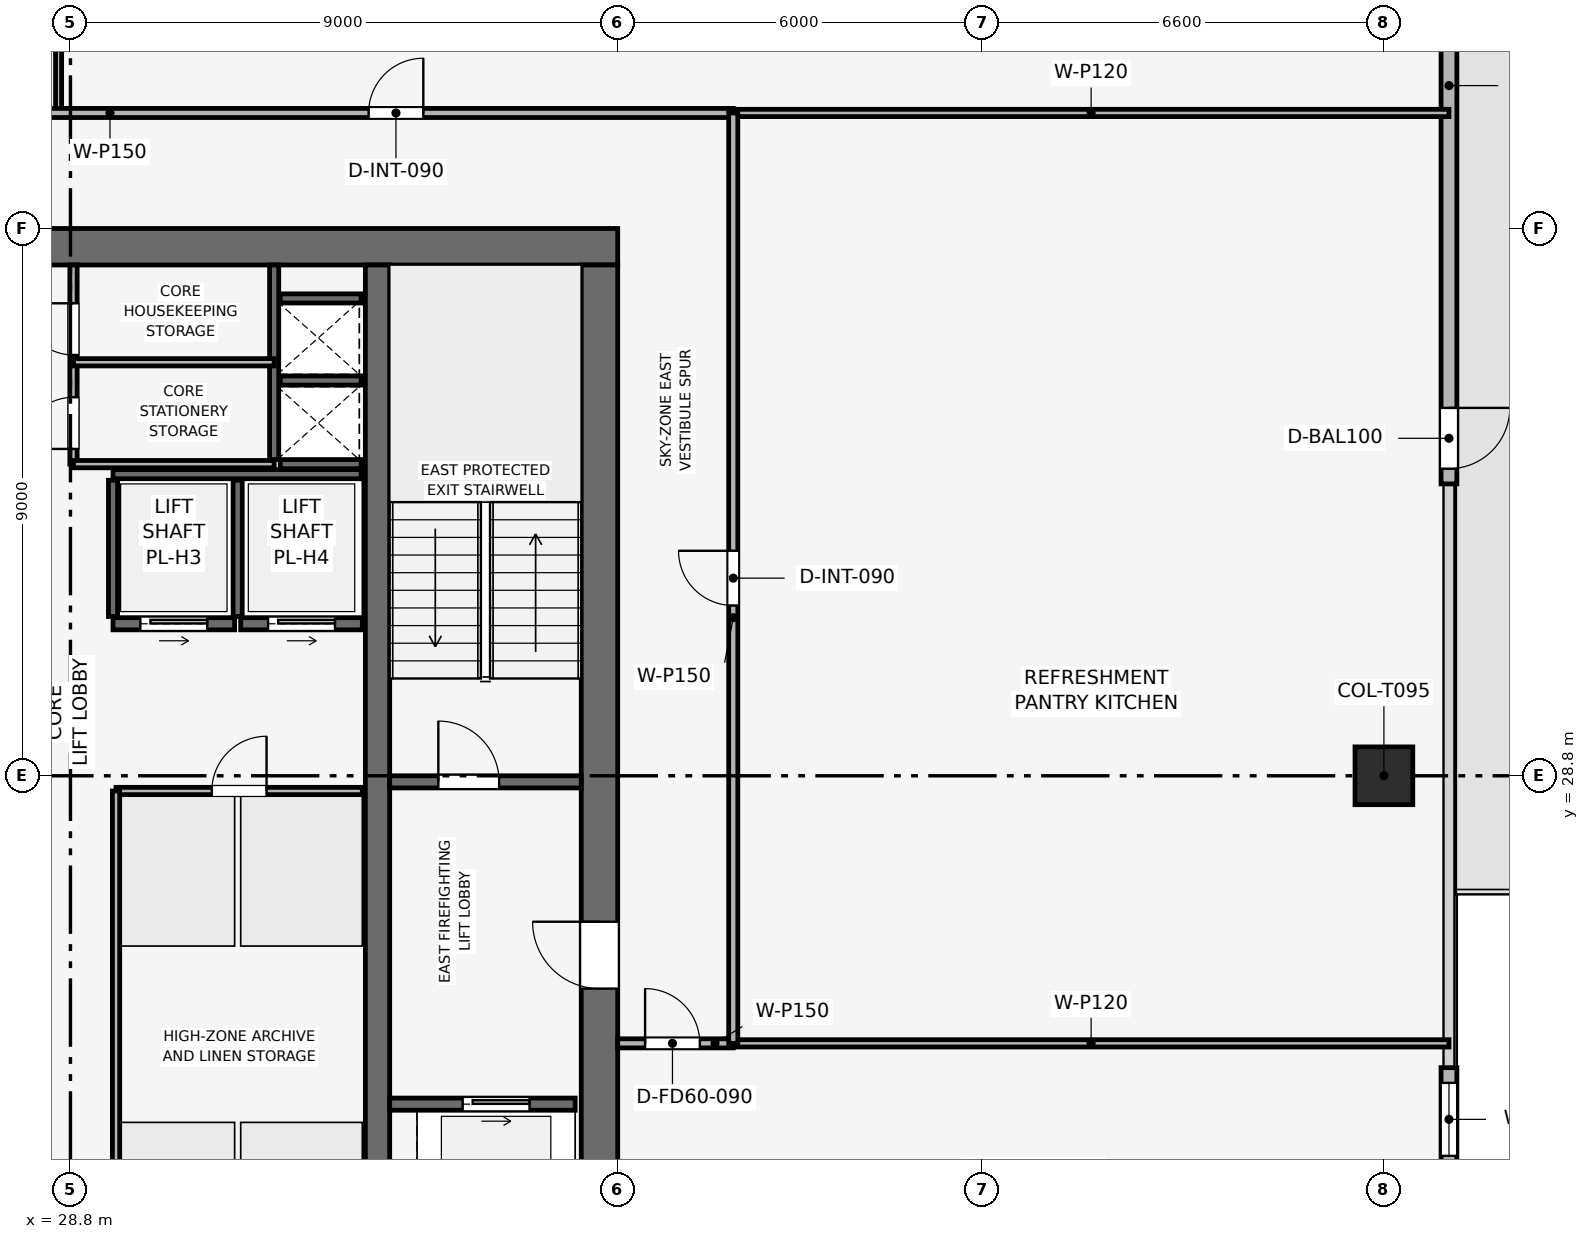
"""IFC4 building model, lengths in metres.
Left out: names, types, materials, properties, quantities, classifications, styles, units other than length and angle.
Written with IfcOpenShell. Run it as: python <this file> out.ifc"""

import sys

from ifc_helpers import new_model, si_unit, direction, frame, frame_2d, origin, origin_2d, place, context, subcontext, project, spatial, rectangle, extrude, element, fill, save


model = new_model("IFC4")
c1 = context("Model", 3, precision=1e-05, world=origin(), true_north=direction((0.0, 1.0)))
c2 = subcontext(c1, "Body", "Model", "MODEL_VIEW")
j1 = project(units=[si_unit("LENGTHUNIT", "METRE"), si_unit("PLANEANGLEUNIT", "RADIAN")], contexts=[c1])
p1 = place(None, origin())
s1 = spatial("IfcSite", under=j1, at=p1, CompositionType="ELEMENT")
p2 = place(p1, origin())
s2 = spatial("IfcBuilding", under=s1, at=p2, CompositionType="ELEMENT")
p3 = place(p2, frame((0.0, 0.0, 329.25)))
s3 = spatial("IfcBuildingStorey", under=s2, at=p3, CompositionType="ELEMENT", Elevation=329.25)
p4 = place(p3, frame((19.8, 37.5, 0.0), z_axis=(0.0, 0.0, 1.0), x_axis=(1.0, 0.0, 0.0)))
e1 = element("IfcWall", 1, at=p4, inside=s3, PredefinedType="SHEAR", context=c2, shape_type="SweptSolid", body=[
    extrude(rectangle(XDim=18.0, YDim=0.6, at=frame_2d((9.0, 0.0))), origin(), (0.0, 0.0, 1.0), 3.75),
])
p5 = place(p4, frame((7.05, 0.0, 0.0)))
e2 = element("IfcOpeningElement", 2, at=p5, cuts=e1, PredefinedType="OPENING", context=c2, shape_type="SweptSolid", body=[
    extrude(rectangle(XDim=1.1, YDim=2.15, at=frame_2d((0.55, 1.075))), frame((0.0, 0.31, 0.0), z_axis=(0.0, -1.0, 0.0), x_axis=(1.0, 0.0, 0.0)), (0.0, 0.0, 1.0), 0.62),
])
p6 = place(p3, frame((37.5, 20.4, 0.0), z_axis=(0.0, 0.0, 1.0), x_axis=(0.0, 1.0, 0.0)))
e3 = element("IfcWall", 3, at=p6, inside=s3, PredefinedType="SHEAR", context=c2, shape_type="SweptSolid", body=[
    extrude(rectangle(XDim=16.8, YDim=0.6, at=frame_2d((8.4, 0.0))), origin(), (0.0, 0.0, 1.0), 3.75),
])
p7 = place(p6, frame((4.9, 0.0, 0.0)))
e4 = element("IfcOpeningElement", 4, at=p7, cuts=e3, PredefinedType="OPENING", context=c2, shape_type="SweptSolid", body=[
    extrude(rectangle(XDim=1.1, YDim=2.15, at=frame_2d((0.55, 1.075))), frame((0.0, 0.31, 0.0), z_axis=(0.0, -1.0, 0.0), x_axis=(1.0, 0.0, 0.0)), (0.0, 0.0, 1.0), 0.62),
])
p8 = place(p3, frame((33.85, 20.4, 0.0), z_axis=(0.0, 0.0, 1.0), x_axis=(0.0, 1.0, 0.0)))
e5 = element("IfcWall", 5, at=p8, inside=s3, PredefinedType="SHEAR", context=c2, shape_type="SweptSolid", body=[
    extrude(rectangle(XDim=16.8, YDim=0.4, at=frame_2d((8.4, 0.0))), origin(), (0.0, 0.0, 1.0), 3.75),
])
p9 = place(p3, frame((50.4, 28.8, 0.003), z_axis=(-0.158025382189, 0.0, 0.987435050312), x_axis=(0.0, -1.0, 0.0)))
e6 = element("IfcColumn", 6, at=p9, inside=s3, PredefinedType="COLUMN", context=c2, shape_type="SweptSolid", body=[
    extrude(rectangle(XDim=0.95, YDim=0.95, at=origin_2d()), origin(), (0.0, 0.0, 1.0), 3.549),
])
p10 = place(p3, frame((51.47, 45.3, 0.0), z_axis=(0.0, 0.0, 1.0), x_axis=(0.0, -1.0, 0.0)))
e7 = element("IfcWall", 7, at=p10, inside=s3, PredefinedType="SOLIDWALL", context=c2, shape_type="SweptSolid", body=[
    extrude(rectangle(XDim=11.7, YDim=0.26, at=frame_2d((5.85, 0.0))), origin(), (0.0, 0.0, 1.0), 3.51),
])
p11 = place(p10, frame((10.45, 0.0, 0.0)))
e8 = element("IfcOpeningElement", 8, at=p11, cuts=e7, PredefinedType="OPENING", context=c2, shape_type="SweptSolid", body=[
    extrude(rectangle(XDim=1.0, YDim=2.2, at=frame_2d((0.5, 1.1))), frame((0.0, 0.14, 0.0), z_axis=(0.0, -1.0, 0.0), x_axis=(1.0, 0.0, 0.0)), (0.0, 0.0, 1.0), 0.28),
])
p12 = place(p3, frame((51.47, 24.0, 0.0), z_axis=(0.0, 0.0, 1.0), x_axis=(0.0, -1.0, 0.0)))
e9 = element("IfcWall", 9, at=p12, inside=s3, PredefinedType="SOLIDWALL", context=c2, shape_type="SweptSolid", body=[
    extrude(rectangle(XDim=11.7, YDim=0.26, at=frame_2d((5.85, 0.0))), origin(), (0.0, 0.0, 1.0), 3.51),
])
p13 = place(p12, frame((0.25, 0.0, 0.9)))
e10 = element("IfcOpeningElement", 10, at=p13, cuts=e9, PredefinedType="OPENING", context=c2, shape_type="SweptSolid", body=[
    extrude(rectangle(XDim=1.2, YDim=2.1, at=frame_2d((0.6, 1.05))), frame((0.0, 0.14, 0.0), z_axis=(0.0, -1.0, 0.0), x_axis=(1.0, 0.0, 0.0)), (0.0, 0.0, 1.0), 0.28),
])
p14 = place(p3, frame((34.05, 28.7, 0.0), z_axis=(0.0, 0.0, 1.0), x_axis=(1.0, 0.0, 0.0)))
e11 = element("IfcWall", 11, at=p14, inside=s3, PredefinedType="SHEAR", context=c2, shape_type="SweptSolid", body=[
    extrude(rectangle(XDim=3.15, YDim=0.2, at=frame_2d((1.575, 0.0))), origin(), (0.0, 0.0, 1.0), 3.51),
])
p15 = place(p14, frame((0.8, 0.0, 0.0)))
e12 = element("IfcOpeningElement", 12, at=p15, cuts=e11, PredefinedType="OPENING", context=c2, shape_type="SweptSolid", body=[
    extrude(rectangle(XDim=1.0, YDim=2.1, at=frame_2d((0.5, 1.05))), frame((0.0, 0.11, 0.0), z_axis=(0.0, -1.0, 0.0), x_axis=(1.0, 0.0, 0.0)), (0.0, 0.0, 1.0), 0.22),
])
p16 = place(p3, frame((32.15, 34.0, 0.0), z_axis=(0.0, 0.0, 1.0), x_axis=(0.0, 1.0, 0.0)))
e13 = element("IfcWall", 13, at=p16, inside=s3, PredefinedType="SHEAR", context=c2, shape_type="SweptSolid", body=[
    extrude(rectangle(XDim=3.2, YDim=0.15, at=frame_2d((1.6, 0.0))), origin(), (0.0, 0.0, 1.0), 3.51),
])
for number, where, z_axis, x_axis in (
    (14, (32.25, 33.925, 0.0), (0.0, 0.0, 1.0), (1.0, 0.0, 0.0)),
    (15, (32.25, 35.3, 0.0), (0.0, 0.0, 1.0), (1.0, 0.0, 0.0)),
):
    element("IfcWall", number, at=place(p3, frame(where, z_axis=z_axis, x_axis=x_axis)), inside=s3, PredefinedType="SHEAR", context=c2, shape_type="SweptSolid", body=[
        extrude(rectangle(XDim=1.33, YDim=0.15, at=frame_2d((0.665, 0.0))), origin(), (0.0, 0.0, 1.0), 3.51),
    ])
p17 = place(p3, frame((34.05, 23.4, 0.0), z_axis=(0.0, 0.0, 1.0), x_axis=(1.0, 0.0, 0.0)))
e16 = element("IfcWall", 16, at=p17, inside=s3, PredefinedType="SHEAR", context=c2, shape_type="SweptSolid", body=[
    extrude(rectangle(XDim=3.05, YDim=0.2, at=frame_2d((1.525, 0.0))), origin(), (0.0, 0.0, 1.0), 3.51),
])
p18 = place(p17, frame((1.2, 0.0, 0.0)))
e17 = element("IfcOpeningElement", 17, at=p18, cuts=e16, PredefinedType="OPENING", context=c2, shape_type="SweptSolid", body=[
    extrude(rectangle(XDim=1.1, YDim=2.15, at=frame_2d((0.55, 1.075))), frame((0.0, 0.11, 0.0), z_axis=(0.0, -1.0, 0.0), x_axis=(1.0, 0.0, 0.0)), (0.0, 0.0, 1.0), 0.22),
])
p19 = place(p3, frame((29.5, 31.3, 0.0), z_axis=(0.0, 0.0, 1.0), x_axis=(1.0, 0.0, 0.0)))
e18 = element("IfcWall", 18, at=p19, inside=s3, PredefinedType="SHEAR", context=c2, shape_type="SweptSolid", body=[
    extrude(rectangle(XDim=2.0, YDim=0.2, at=frame_2d((1.0, 0.0))), origin(), (0.0, 0.0, 1.0), 3.51),
])
p20 = place(p19, frame((0.45, 0.0, 0.0)))
e19 = element("IfcOpeningElement", 19, at=p20, cuts=e18, PredefinedType="OPENING", context=c2, shape_type="SweptSolid", body=[
    extrude(rectangle(XDim=1.1, YDim=2.15, at=frame_2d((0.55, 1.075))), frame((0.0, 0.11, 0.0), z_axis=(0.0, -1.0, 0.0), x_axis=(1.0, 0.0, 0.0)), (0.0, 0.0, 1.0), 0.22),
])
p21 = place(p3, frame((31.6, 31.3, 0.0), z_axis=(0.0, 0.0, 1.0), x_axis=(1.0, 0.0, 0.0)))
e20 = element("IfcWall", 20, at=p21, inside=s3, PredefinedType="SHEAR", context=c2, shape_type="SweptSolid", body=[
    extrude(rectangle(XDim=2.0, YDim=0.2, at=frame_2d((1.0, 0.0))), origin(), (0.0, 0.0, 1.0), 3.51),
])
p22 = place(p21, frame((0.45, 0.0, 0.0)))
e21 = element("IfcOpeningElement", 21, at=p22, cuts=e20, PredefinedType="OPENING", context=c2, shape_type="SweptSolid", body=[
    extrude(rectangle(XDim=1.1, YDim=2.15, at=frame_2d((0.55, 1.075))), frame((0.0, 0.11, 0.0), z_axis=(0.0, -1.0, 0.0), x_axis=(1.0, 0.0, 0.0)), (0.0, 0.0, 1.0), 0.22),
])
p23 = place(p3, frame((32.25, 36.65, 0.0), z_axis=(0.0, 0.0, 1.0), x_axis=(1.0, 0.0, 0.0)))
e22 = element("IfcWall", 22, at=p23, inside=s3, PredefinedType="SHEAR", context=c2, shape_type="SweptSolid", body=[
    extrude(rectangle(XDim=1.33, YDim=0.15, at=frame_2d((0.665, 0.0))), origin(), (0.0, 0.0, 1.0), 3.51),
])
p24 = place(p3, frame((29.5, 33.76, 0.0), z_axis=(0.0, 0.0, 1.0), x_axis=(1.0, 0.0, 0.0)))
e23 = element("IfcWall", 23, at=p24, inside=s3, PredefinedType="SHEAR", context=c2, shape_type="SweptSolid", body=[
    extrude(rectangle(XDim=4.08, YDim=0.15, at=frame_2d((2.04, 0.0))), origin(), (0.0, 0.0, 1.0), 3.51),
])
for number, where, z_axis, x_axis in (
    (24, (29.5, 31.42, 0.0), (0.0, 0.0, 1.0), (0.0, 1.0, 0.0)),
    (25, (31.55, 31.42, 0.0), (0.0, 0.0, 1.0), (0.0, 1.0, 0.0)),
):
    element("IfcWall", number, at=place(p3, frame(where, z_axis=z_axis, x_axis=x_axis)), inside=s3, PredefinedType="SHEAR", context=c2, shape_type="SweptSolid", body=[
        extrude(rectangle(XDim=2.24, YDim=0.15, at=frame_2d((1.12, 0.0))), origin(), (0.0, 0.0, 1.0), 3.51),
    ])
p25 = place(p3, frame((28.85, 33.925, 0.0), z_axis=(0.0, 0.0, 1.0), x_axis=(0.0, 1.0, 0.0)))
e26 = element("IfcWall", 26, at=p25, inside=s3, PredefinedType="PARTITIONING", context=c2, shape_type="SweptSolid", body=[
    extrude(rectangle(XDim=3.275, YDim=0.12, at=frame_2d((1.637, 0.0))), origin(), (0.0, 0.0, 1.0), 3.51),
])
p26 = place(p25, frame((0.25, 0.0, 0.0)))
e27 = element("IfcOpeningElement", 27, at=p26, cuts=e26, PredefinedType="OPENING", context=c2, shape_type="SweptSolid", body=[
    extrude(rectangle(XDim=0.85, YDim=2.1, at=frame_2d((0.425, 1.05))), frame((0.0, 0.07, 0.0), z_axis=(0.0, -1.0, 0.0), x_axis=(1.0, 0.0, 0.0)), (0.0, 0.0, 1.0), 0.14),
])
p27 = place(p25, frame((1.795, 0.0, 0.0)))
e28 = element("IfcOpeningElement", 28, at=p27, cuts=e26, PredefinedType="OPENING", context=c2, shape_type="SweptSolid", body=[
    extrude(rectangle(XDim=0.85, YDim=2.1, at=frame_2d((0.425, 1.05))), frame((0.0, 0.07, 0.0), z_axis=(0.0, -1.0, 0.0), x_axis=(1.0, 0.0, 0.0)), (0.0, 0.0, 1.0), 0.14),
])
for number, where, z_axis, x_axis in (
    (29, (28.85, 35.6, 0.0), (0.0, 0.0, 1.0), (1.0, 0.0, 0.0)),
    (30, (28.85, 33.925, 0.0), (0.0, 0.0, 1.0), (1.0, 0.0, 0.0)),
):
    element("IfcWall", number, at=place(p3, frame(where, z_axis=z_axis, x_axis=x_axis)), inside=s3, PredefinedType="PARTITIONING", context=c2, shape_type="SweptSolid", body=[
        extrude(rectangle(XDim=3.3, YDim=0.12, at=frame_2d((1.65, 0.0))), origin(), (0.0, 0.0, 1.0), 3.51),
    ])
p28 = place(p3, frame((29.55, 28.55, 0.0), z_axis=(0.0, 0.0, 1.0), x_axis=(1.0, 0.0, 0.0)))
e31 = element("IfcWall", 31, at=p28, inside=s3, PredefinedType="PARTITIONING", context=c2, shape_type="SweptSolid", body=[
    extrude(rectangle(XDim=4.05, YDim=0.12, at=frame_2d((2.025, 0.0))), origin(), (0.0, 0.0, 1.0), 3.51),
])
p29 = place(p28, frame((1.575, 0.0, 0.0)))
e32 = element("IfcOpeningElement", 32, at=p29, cuts=e31, PredefinedType="OPENING", context=c2, shape_type="SweptSolid", body=[
    extrude(rectangle(XDim=0.9, YDim=2.1, at=frame_2d((0.45, 1.05))), frame((0.0, 0.07, 0.0), z_axis=(0.0, -1.0, 0.0), x_axis=(1.0, 0.0, 0.0)), (0.0, 0.0, 1.0), 0.14),
])
p30 = place(p3, frame((29.55, 20.4, 0.0), z_axis=(0.0, 0.0, 1.0), x_axis=(0.0, 1.0, 0.0)))
e33 = element("IfcWall", 33, at=p30, inside=s3, PredefinedType="PARTITIONING", context=c2, shape_type="SweptSolid", body=[
    extrude(rectangle(XDim=8.15, YDim=0.12, at=frame_2d((4.075, 0.0))), origin(), (0.0, 0.0, 1.0), 3.51),
])
p31 = place(p3, frame((28.605, 39.7, 0.0), z_axis=(0.0, 0.0, 1.0), x_axis=(0.0, 1.0, 0.0)))
e34 = element("IfcWall", 34, at=p31, inside=s3, PredefinedType="MOVABLE", context=c2, shape_type="SweptSolid", body=[
    extrude(rectangle(XDim=11.77, YDim=0.1, at=frame_2d((5.885, 0.0))), origin(), (0.0, 0.0, 1.0), 3.095),
])
p32 = place(p3, frame((37.8, 24.4, 0.0), z_axis=(0.0, 0.0, 1.0), x_axis=(1.0, 0.0, 0.0)))
e35 = element("IfcWall", 35, at=p32, inside=s3, PredefinedType="PARTITIONING", context=c2, shape_type="SweptSolid", body=[
    extrude(rectangle(XDim=1.9, YDim=0.15, at=frame_2d((0.95, 0.0))), origin(), (0.0, 0.0, 1.0), 3.51),
])
p33 = place(p32, frame((0.45, 0.0, 0.0)))
e36 = element("IfcOpeningElement", 36, at=p33, cuts=e35, PredefinedType="OPENING", context=c2, shape_type="SweptSolid", body=[
    extrude(rectangle(XDim=0.9, YDim=2.1, at=frame_2d((0.45, 1.05))), frame((0.0, 0.085, 0.0), z_axis=(0.0, -1.0, 0.0), x_axis=(1.0, 0.0, 0.0)), (0.0, 0.0, 1.0), 0.17),
])
p34 = place(p3, frame((39.7, 24.4, 0.0), z_axis=(0.0, 0.0, 1.0), x_axis=(1.0, 0.0, 0.0)))
e37 = element("IfcWall", 37, at=p34, inside=s3, PredefinedType="PARTITIONING", context=c2, shape_type="SweptSolid", body=[
    extrude(rectangle(XDim=11.77, YDim=0.12, at=frame_2d((5.885, 0.0))), origin(), (0.0, 0.0, 1.0), 3.135),
])
p35 = place(p3, frame((39.7, 39.7, 0.0), z_axis=(0.0, 0.0, 1.0), x_axis=(1.0, 0.0, 0.0)))
e38 = element("IfcWall", 38, at=p35, inside=s3, PredefinedType="PARTITIONING", context=c2, shape_type="SweptSolid", body=[
    extrude(rectangle(XDim=11.77, YDim=0.12, at=frame_2d((5.885, 0.0))), origin(), (0.0, 0.0, 1.0), 3.095),
])
p36 = place(p3, frame((17.9, 39.7, 0.0), z_axis=(0.0, 0.0, 1.0), x_axis=(1.0, 0.0, 0.0)))
e39 = element("IfcWall", 39, at=p36, inside=s3, PredefinedType="PARTITIONING", context=c2, shape_type="SweptSolid", body=[
    extrude(rectangle(XDim=21.8, YDim=0.15, at=frame_2d((10.9, 0.0))), origin(), (0.0, 0.0, 1.0), 3.095),
])
p37 = place(p36, frame((0.7, 0.0, 0.0)))
e40 = element("IfcOpeningElement", 40, at=p37, cuts=e39, PredefinedType="OPENING", context=c2, shape_type="SweptSolid", body=[
    extrude(rectangle(XDim=0.9, YDim=2.1, at=frame_2d((0.45, 1.05))), frame((0.0, 0.085, 0.0), z_axis=(0.0, -1.0, 0.0), x_axis=(1.0, 0.0, 0.0)), (0.0, 0.0, 1.0), 0.17),
])
p38 = place(p36, frame((6.053, 0.0, 0.0)))
e41 = element("IfcOpeningElement", 41, at=p38, cuts=e39, PredefinedType="OPENING", context=c2, shape_type="SweptSolid", body=[
    extrude(rectangle(XDim=0.9, YDim=2.1, at=frame_2d((0.45, 1.05))), frame((0.0, 0.085, 0.0), z_axis=(0.0, -1.0, 0.0), x_axis=(1.0, 0.0, 0.0)), (0.0, 0.0, 1.0), 0.17),
])
p39 = place(p36, frame((15.803, 0.0, 0.0)))
e42 = element("IfcOpeningElement", 42, at=p39, cuts=e39, PredefinedType="OPENING", context=c2, shape_type="SweptSolid", body=[
    extrude(rectangle(XDim=0.9, YDim=2.1, at=frame_2d((0.45, 1.05))), frame((0.0, 0.085, 0.0), z_axis=(0.0, -1.0, 0.0), x_axis=(1.0, 0.0, 0.0)), (0.0, 0.0, 1.0), 0.17),
])
p40 = place(p3, frame((39.7, 24.4, 0.0), z_axis=(0.0, 0.0, 1.0), x_axis=(0.0, 1.0, 0.0)))
e43 = element("IfcWall", 43, at=p40, inside=s3, PredefinedType="PARTITIONING", context=c2, shape_type="SweptSolid", body=[
    extrude(rectangle(XDim=15.3, YDim=0.15, at=frame_2d((7.65, 0.0))), origin(), (0.0, 0.0, 1.0), 3.095),
])
p41 = place(p40, frame((7.2, 0.0, 0.0)))
e44 = element("IfcOpeningElement", 44, at=p41, cuts=e43, PredefinedType="OPENING", context=c2, shape_type="SweptSolid", body=[
    extrude(rectangle(XDim=0.9, YDim=2.1, at=frame_2d((0.45, 1.05))), frame((0.0, 0.085, 0.0), z_axis=(0.0, -1.0, 0.0), x_axis=(1.0, 0.0, 0.0)), (0.0, 0.0, 1.0), 0.17),
])
p42 = place(p11, origin())
e45 = element("IfcDoor", 45, at=p42, inside=s3, OperationType="SINGLE_SWING_LEFT", PredefinedType="DOOR", context=c2, shape_type="SweptSolid", body=[
    extrude(rectangle(XDim=1.0, YDim=2.2, at=frame_2d((0.5, 1.1))), frame((0.0, 0.025, 0.0), z_axis=(0.0, -1.0, 0.0), x_axis=(1.0, 0.0, 0.0)), (0.0, 0.0, 1.0), 0.05),
])
fill(e8, e45)
p43 = place(p13, origin())
e46 = element("IfcWindow", 46, at=p43, inside=s3, PartitioningType="SINGLE_PANEL", PredefinedType="WINDOW", context=c2, shape_type="SweptSolid", body=[
    extrude(rectangle(XDim=1.2, YDim=2.1, at=frame_2d((0.6, 1.05))), frame((0.0, 0.03, 0.0), z_axis=(0.0, -1.0, 0.0), x_axis=(1.0, 0.0, 0.0)), (0.0, 0.0, 1.0), 0.06),
])
fill(e10, e46)
p44 = place(p15, origin())
e47 = element("IfcDoor", 47, at=p44, inside=s3, OperationType="SINGLE_SWING_LEFT", PredefinedType="DOOR", context=c2, shape_type="SweptSolid", body=[
    extrude(rectangle(XDim=1.0, YDim=2.1, at=frame_2d((0.5, 1.05))), frame((0.0, 0.025, 0.0), z_axis=(0.0, -1.0, 0.0), x_axis=(1.0, 0.0, 0.0)), (0.0, 0.0, 1.0), 0.05),
])
fill(e12, e47)
p45 = place(p18, origin())
e48 = element("IfcDoor", 48, at=p45, inside=s3, OperationType="SLIDING_TO_RIGHT", PredefinedType="DOOR", context=c2, shape_type="SweptSolid", body=[
    extrude(rectangle(XDim=1.1, YDim=2.15, at=frame_2d((0.55, 1.075))), frame((0.0, 0.025, 0.0), z_axis=(0.0, -1.0, 0.0), x_axis=(1.0, 0.0, 0.0)), (0.0, 0.0, 1.0), 0.05),
])
fill(e17, e48)
p46 = place(p20, origin())
e49 = element("IfcDoor", 49, at=p46, inside=s3, OperationType="SLIDING_TO_RIGHT", PredefinedType="DOOR", context=c2, shape_type="SweptSolid", body=[
    extrude(rectangle(XDim=1.1, YDim=2.15, at=frame_2d((0.55, 1.075))), frame((0.0, 0.025, 0.0), z_axis=(0.0, -1.0, 0.0), x_axis=(1.0, 0.0, 0.0)), (0.0, 0.0, 1.0), 0.05),
])
fill(e19, e49)
p47 = place(p22, origin())
e50 = element("IfcDoor", 50, at=p47, inside=s3, OperationType="SLIDING_TO_RIGHT", PredefinedType="DOOR", context=c2, shape_type="SweptSolid", body=[
    extrude(rectangle(XDim=1.1, YDim=2.15, at=frame_2d((0.55, 1.075))), frame((0.0, 0.025, 0.0), z_axis=(0.0, -1.0, 0.0), x_axis=(1.0, 0.0, 0.0)), (0.0, 0.0, 1.0), 0.05),
])
fill(e21, e50)
p48 = place(p26, origin())
e51 = element("IfcDoor", 51, at=p48, inside=s3, OperationType="SINGLE_SWING_LEFT", PredefinedType="DOOR", context=c2, shape_type="SweptSolid", body=[
    extrude(rectangle(XDim=0.85, YDim=2.1, at=frame_2d((0.425, 1.05))), frame((0.0, 0.025, 0.0), z_axis=(0.0, -1.0, 0.0), x_axis=(1.0, 0.0, 0.0)), (0.0, 0.0, 1.0), 0.05),
])
fill(e27, e51)
p49 = place(p27, origin())
e52 = element("IfcDoor", 52, at=p49, inside=s3, OperationType="SINGLE_SWING_RIGHT", PredefinedType="DOOR", context=c2, shape_type="SweptSolid", body=[
    extrude(rectangle(XDim=0.85, YDim=2.1, at=frame_2d((0.425, 1.05))), frame((0.0, 0.025, 0.0), z_axis=(0.0, -1.0, 0.0), x_axis=(1.0, 0.0, 0.0)), (0.0, 0.0, 1.0), 0.05),
])
fill(e28, e52)
p50 = place(p29, origin())
e53 = element("IfcDoor", 53, at=p50, inside=s3, OperationType="SINGLE_SWING_RIGHT", PredefinedType="DOOR", context=c2, shape_type="SweptSolid", body=[
    extrude(rectangle(XDim=0.9, YDim=2.1, at=frame_2d((0.45, 1.05))), frame((0.0, 0.025, 0.0), z_axis=(0.0, -1.0, 0.0), x_axis=(1.0, 0.0, 0.0)), (0.0, 0.0, 1.0), 0.05),
])
fill(e32, e53)
p51 = place(p33, origin())
e54 = element("IfcDoor", 54, at=p51, inside=s3, OperationType="SINGLE_SWING_LEFT", PredefinedType="DOOR", context=c2, shape_type="SweptSolid", body=[
    extrude(rectangle(XDim=0.9, YDim=2.1, at=frame_2d((0.45, 1.05))), frame((0.0, 0.025, 0.0), z_axis=(0.0, -1.0, 0.0), x_axis=(1.0, 0.0, 0.0)), (0.0, 0.0, 1.0), 0.05),
])
fill(e36, e54)
p52 = place(p39, origin())
e55 = element("IfcDoor", 55, at=p52, inside=s3, OperationType="SINGLE_SWING_RIGHT", PredefinedType="DOOR", context=c2, shape_type="SweptSolid", body=[
    extrude(rectangle(XDim=0.9, YDim=2.1, at=frame_2d((0.45, 1.05))), frame((0.0, 0.025, 0.0), z_axis=(0.0, -1.0, 0.0), x_axis=(1.0, 0.0, 0.0)), (0.0, 0.0, 1.0), 0.05),
])
fill(e42, e55)
p53 = place(p41, origin())
e56 = element("IfcDoor", 56, at=p53, inside=s3, OperationType="SINGLE_SWING_RIGHT", PredefinedType="DOOR", context=c2, shape_type="SweptSolid", body=[
    extrude(rectangle(XDim=0.9, YDim=2.1, at=frame_2d((0.45, 1.05))), frame((0.0, 0.025, 0.0), z_axis=(0.0, -1.0, 0.0), x_axis=(1.0, 0.0, 0.0)), (0.0, 0.0, 1.0), 0.05),
])
fill(e44, e56)
p54 = place(p7, origin())
e57 = element("IfcDoor", 57, at=p54, inside=s3, OperationType="SINGLE_SWING_RIGHT", PredefinedType="DOOR", context=c2, shape_type="SweptSolid", body=[
    extrude(rectangle(XDim=1.1, YDim=2.15, at=frame_2d((0.55, 1.075))), frame((0.0, 0.025, 0.0), z_axis=(0.0, -1.0, 0.0), x_axis=(1.0, 0.0, 0.0)), (0.0, 0.0, 1.0), 0.05),
])
fill(e4, e57)
save(model, sys.argv[1])
